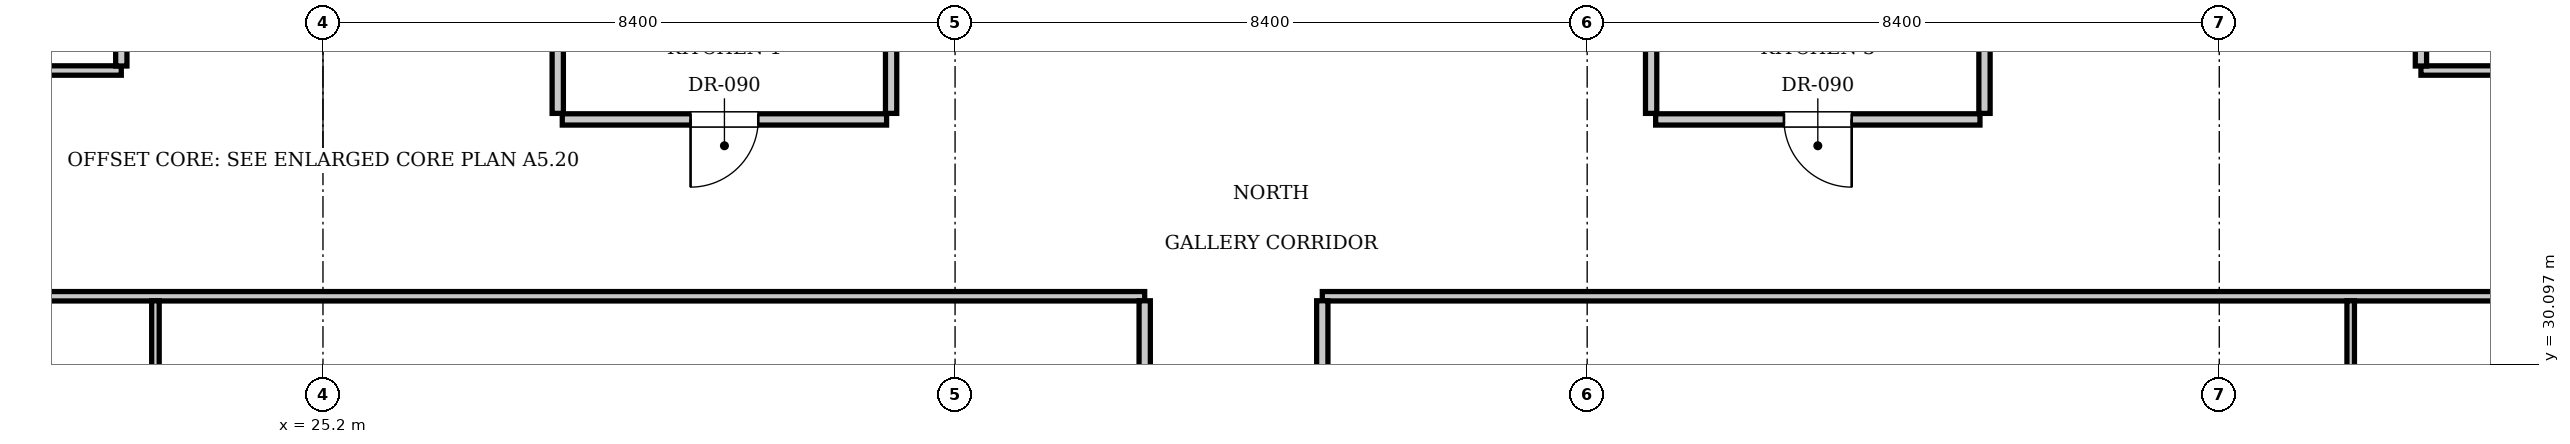
"""IFC4 building model, lengths in metres.
Left out: names, types, materials, properties, quantities, classifications, styles, units other than length and angle.
Written with IfcOpenShell. Run it as: python <this file> out.ifc"""

import sys

from ifc_helpers import new_model, si_unit, direction, frame, frame_2d, origin, place, context, subcontext, project, spatial, rectangle, extrude, element, fill, save


model = new_model("IFC4")
c1 = context("Model", 3, precision=1e-05, world=origin(), true_north=direction((0.0, 1.0)))
c2 = subcontext(c1, "Body", "Model", "MODEL_VIEW")
j1 = project(units=[si_unit("LENGTHUNIT", "METRE"), si_unit("PLANEANGLEUNIT", "RADIAN")], contexts=[c1])
p1 = place(None, origin())
s1 = spatial("IfcSite", under=j1, at=p1, CompositionType="ELEMENT")
p2 = place(p1, origin())
s2 = spatial("IfcBuilding", under=s1, at=p2, CompositionType="ELEMENT")
p3 = place(p2, frame((0.0, 0.0, 162.05)))
s3 = spatial("IfcBuildingStorey", under=s2, at=p3, CompositionType="ELEMENT", Elevation=162.05)
for number, where, z_axis, x_axis in (
    (1, (28.32, 33.43, 0.0), (0.0, 0.0, 1.0), (0.0, 1.0, 0.0)),
    (2, (32.75, 33.43, 0.0), (0.0, 0.0, 1.0), (0.0, 1.0, 0.0)),
):
    element("IfcWall", number, at=place(p3, frame(where, z_axis=z_axis, x_axis=x_axis)), inside=s3, PredefinedType="PARTITIONING", context=c2, shape_type="SweptSolid", body=[
        extrude(rectangle(XDim=2.69, YDim=0.15, at=frame_2d((1.345, 0.0))), origin(), (0.0, 0.0, 1.0), 3.61),
    ])
p4 = place(p3, frame((28.38, 33.35, 0.0), z_axis=(0.0, 0.0, 1.0), x_axis=(1.0, 0.0, 0.0)))
e3 = element("IfcWall", 3, at=p4, inside=s3, PredefinedType="PARTITIONING", context=c2, shape_type="SweptSolid", body=[
    extrude(rectangle(XDim=4.31, YDim=0.15, at=frame_2d((2.155, 0.0))), origin(), (0.0, 0.0, 1.0), 3.61),
])
p5 = place(p4, frame((1.705, 0.0, 0.0)))
e4 = element("IfcOpeningElement", 4, at=p5, cuts=e3, PredefinedType="OPENING", context=c2, shape_type="SweptSolid", body=[
    extrude(rectangle(XDim=0.9, YDim=2.1, at=frame_2d((0.45, 1.05))), frame((0.0, 0.085, 0.0), z_axis=(0.0, -1.0, 0.0), x_axis=(1.0, 0.0, 0.0)), (0.0, 0.0, 1.0), 0.17),
])
for number, where, z_axis, x_axis in (
    (5, (42.85, 33.43, 0.0), (0.0, 0.0, 1.0), (0.0, 1.0, 0.0)),
    (6, (47.28, 33.43, 0.0), (0.0, 0.0, 1.0), (0.0, 1.0, 0.0)),
):
    element("IfcWall", number, at=place(p3, frame(where, z_axis=z_axis, x_axis=x_axis)), inside=s3, PredefinedType="PARTITIONING", context=c2, shape_type="SweptSolid", body=[
        extrude(rectangle(XDim=2.69, YDim=0.15, at=frame_2d((1.345, 0.0))), origin(), (0.0, 0.0, 1.0), 3.61),
    ])
p6 = place(p3, frame((42.91, 33.35, 0.0), z_axis=(0.0, 0.0, 1.0), x_axis=(1.0, 0.0, 0.0)))
e7 = element("IfcWall", 7, at=p6, inside=s3, PredefinedType="PARTITIONING", context=c2, shape_type="SweptSolid", body=[
    extrude(rectangle(XDim=4.31, YDim=0.15, at=frame_2d((2.155, 0.0))), origin(), (0.0, 0.0, 1.0), 3.61),
])
p7 = place(p6, frame((1.705, 0.0, 0.0)))
e8 = element("IfcOpeningElement", 8, at=p7, cuts=e7, PredefinedType="OPENING", context=c2, shape_type="SweptSolid", body=[
    extrude(rectangle(XDim=0.9, YDim=2.1, at=frame_2d((0.45, 1.05))), frame((0.0, 0.085, 0.0), z_axis=(0.0, -1.0, 0.0), x_axis=(1.0, 0.0, 0.0)), (0.0, 0.0, 1.0), 0.17),
])
p8 = place(p3, frame((13.2, 31.0, 0.0), z_axis=(0.0, 0.0, 1.0), x_axis=(1.0, 0.0, 0.0)))
e9 = element("IfcWall", 9, at=p8, inside=s3, PredefinedType="PARTITIONING", context=c2, shape_type="SweptSolid", body=[
    extrude(rectangle(XDim=22.92, YDim=0.125, at=frame_2d((11.46, 0.0))), origin(), (0.0, 0.0, 1.0), 3.61),
])
p9 = place(p3, frame((38.48, 31.0, 0.0), z_axis=(0.0, 0.0, 1.0), x_axis=(1.0, 0.0, 0.0)))
e10 = element("IfcWall", 10, at=p9, inside=s3, PredefinedType="PARTITIONING", context=c2, shape_type="SweptSolid", body=[
    extrude(rectangle(XDim=23.92, YDim=0.125, at=frame_2d((11.96, 0.0))), origin(), (0.0, 0.0, 1.0), 3.61),
])
p10 = place(p3, frame((36.12, 26.7, 0.0), z_axis=(0.0, 0.0, 1.0), x_axis=(0.0, 1.0, 0.0)))
e11 = element("IfcWall", 11, at=p10, inside=s3, PredefinedType="PARTITIONING", context=c2, shape_type="SweptSolid", body=[
    extrude(rectangle(XDim=4.24, YDim=0.15, at=frame_2d((2.12, 0.0))), origin(), (0.0, 0.0, 1.0), 3.61),
])
p11 = place(p10, frame((1.645, 0.0, 0.0)))
e12 = element("IfcOpeningElement", 12, at=p11, cuts=e11, PredefinedType="OPENING", context=c2, shape_type="SweptSolid", body=[
    extrude(rectangle(XDim=0.95, YDim=2.15, at=frame_2d((0.475, 1.075))), frame((0.0, 0.085, 0.0), z_axis=(0.0, -1.0, 0.0), x_axis=(1.0, 0.0, 0.0)), (0.0, 0.0, 1.0), 0.17),
])
p12 = place(p3, frame((22.974, 24.41, 0.0), z_axis=(0.0, 0.0, 1.0), x_axis=(0.0, 1.0, 0.0)))
e13 = element("IfcWall", 13, at=p12, inside=s3, PredefinedType="PARTITIONING", context=c2, shape_type="SweptSolid", body=[
    extrude(rectangle(XDim=6.53, YDim=0.1, at=frame_2d((3.265, 0.0))), origin(), (0.0, 0.0, 1.0), 3.61),
])
p13 = place(p12, frame((3.895, 0.0, 0.0)))
e14 = element("IfcOpeningElement", 14, at=p13, cuts=e13, PredefinedType="OPENING", context=c2, shape_type="SweptSolid", body=[
    extrude(rectangle(XDim=0.9, YDim=2.1, at=frame_2d((0.45, 1.05))), frame((0.0, 0.06, 0.0), z_axis=(0.0, -1.0, 0.0), x_axis=(1.0, 0.0, 0.0)), (0.0, 0.0, 1.0), 0.12),
])
p14 = place(p3, frame((38.48, 26.7, 0.0), z_axis=(0.0, 0.0, 1.0), x_axis=(0.0, 1.0, 0.0)))
e15 = element("IfcWall", 15, at=p14, inside=s3, PredefinedType="PARTITIONING", context=c2, shape_type="SweptSolid", body=[
    extrude(rectangle(XDim=4.24, YDim=0.15, at=frame_2d((2.12, 0.0))), origin(), (0.0, 0.0, 1.0), 3.61),
])
p15 = place(p14, frame((1.645, 0.0, 0.0)))
e16 = element("IfcOpeningElement", 16, at=p15, cuts=e15, PredefinedType="OPENING", context=c2, shape_type="SweptSolid", body=[
    extrude(rectangle(XDim=0.95, YDim=2.15, at=frame_2d((0.475, 1.075))), frame((0.0, 0.085, 0.0), z_axis=(0.0, -1.0, 0.0), x_axis=(1.0, 0.0, 0.0)), (0.0, 0.0, 1.0), 0.17),
])
p16 = place(p3, frame((52.146, 24.41, 0.0), z_axis=(0.0, 0.0, 1.0), x_axis=(0.0, 1.0, 0.0)))
e17 = element("IfcWall", 17, at=p16, inside=s3, PredefinedType="PARTITIONING", context=c2, shape_type="SweptSolid", body=[
    extrude(rectangle(XDim=6.53, YDim=0.1, at=frame_2d((3.265, 0.0))), origin(), (0.0, 0.0, 1.0), 3.61),
])
p17 = place(p16, frame((3.895, 0.0, 0.0)))
e18 = element("IfcOpeningElement", 18, at=p17, cuts=e17, PredefinedType="OPENING", context=c2, shape_type="SweptSolid", body=[
    extrude(rectangle(XDim=0.9, YDim=2.1, at=frame_2d((0.45, 1.05))), frame((0.0, 0.06, 0.0), z_axis=(0.0, -1.0, 0.0), x_axis=(1.0, 0.0, 0.0)), (0.0, 0.0, 1.0), 0.12),
])
p18 = place(p3, frame((13.2, 34.0, 0.0), z_axis=(0.0, 0.0, 1.0), x_axis=(1.0, 0.0, 0.0)))
e19 = element("IfcWall", 19, at=p18, inside=s3, PredefinedType="PARTITIONING", context=c2, shape_type="SweptSolid", body=[
    extrude(rectangle(XDim=9.32, YDim=0.125, at=frame_2d((4.66, 0.0))), origin(), (0.0, 0.0, 1.0), 3.61),
])
p19 = place(p3, frame((53.08, 34.0, 0.0), z_axis=(0.0, 0.0, 1.0), x_axis=(1.0, 0.0, 0.0)))
e20 = element("IfcWall", 20, at=p19, inside=s3, PredefinedType="PARTITIONING", context=c2, shape_type="SweptSolid", body=[
    extrude(rectangle(XDim=9.32, YDim=0.125, at=frame_2d((4.66, 0.0))), origin(), (0.0, 0.0, 1.0), 3.61),
])
p20 = place(p3, frame((22.52, 34.06, 0.0), z_axis=(0.0, 0.0, 1.0), x_axis=(0.0, 1.0, 0.0)))
e21 = element("IfcWall", 21, at=p20, inside=s3, PredefinedType="PARTITIONING", context=c2, shape_type="SweptSolid", body=[
    extrude(rectangle(XDim=13.127, YDim=0.15, at=frame_2d((6.564, 0.0))), origin(), (0.0, 0.0, 1.0), 3.61),
])
p21 = place(p20, frame((6.089, 0.0, 0.0)))
e22 = element("IfcOpeningElement", 22, at=p21, cuts=e21, PredefinedType="OPENING", context=c2, shape_type="SweptSolid", body=[
    extrude(rectangle(XDim=0.95, YDim=2.15, at=frame_2d((0.475, 1.075))), frame((0.0, 0.085, 0.0), z_axis=(0.0, -1.0, 0.0), x_axis=(1.0, 0.0, 0.0)), (0.0, 0.0, 1.0), 0.17),
])
p22 = place(p3, frame((53.08, 34.06, 0.0), z_axis=(0.0, 0.0, 1.0), x_axis=(0.0, 1.0, 0.0)))
e23 = element("IfcWall", 23, at=p22, inside=s3, PredefinedType="PARTITIONING", context=c2, shape_type="SweptSolid", body=[
    extrude(rectangle(XDim=13.127, YDim=0.15, at=frame_2d((6.564, 0.0))), origin(), (0.0, 0.0, 1.0), 3.61),
])
p23 = place(p22, frame((6.089, 0.0, 0.0)))
e24 = element("IfcOpeningElement", 24, at=p23, cuts=e23, PredefinedType="OPENING", context=c2, shape_type="SweptSolid", body=[
    extrude(rectangle(XDim=0.95, YDim=2.15, at=frame_2d((0.475, 1.075))), frame((0.0, 0.085, 0.0), z_axis=(0.0, -1.0, 0.0), x_axis=(1.0, 0.0, 0.0)), (0.0, 0.0, 1.0), 0.17),
])
p24 = place(p5, frame((0.9, 0.0, 0.0), z_axis=(0.0, 0.0, 1.0), x_axis=(-1.0, 0.0, 0.0)))
e25 = element("IfcDoor", 25, at=p24, inside=s3, OperationType="SINGLE_SWING_RIGHT", PredefinedType="DOOR", context=c2, shape_type="SweptSolid", body=[
    extrude(rectangle(XDim=0.9, YDim=2.1, at=frame_2d((0.45, 1.05))), frame((0.0, 0.025, 0.0), z_axis=(0.0, -1.0, 0.0), x_axis=(1.0, 0.0, 0.0)), (0.0, 0.0, 1.0), 0.05),
])
fill(e4, e25)
p25 = place(p7, frame((0.9, 0.0, 0.0), z_axis=(0.0, 0.0, 1.0), x_axis=(-1.0, 0.0, 0.0)))
e26 = element("IfcDoor", 26, at=p25, inside=s3, OperationType="SINGLE_SWING_LEFT", PredefinedType="DOOR", context=c2, shape_type="SweptSolid", body=[
    extrude(rectangle(XDim=0.9, YDim=2.1, at=frame_2d((0.45, 1.05))), frame((0.0, 0.025, 0.0), z_axis=(0.0, -1.0, 0.0), x_axis=(1.0, 0.0, 0.0)), (0.0, 0.0, 1.0), 0.05),
])
fill(e8, e26)
save(model, sys.argv[1])
